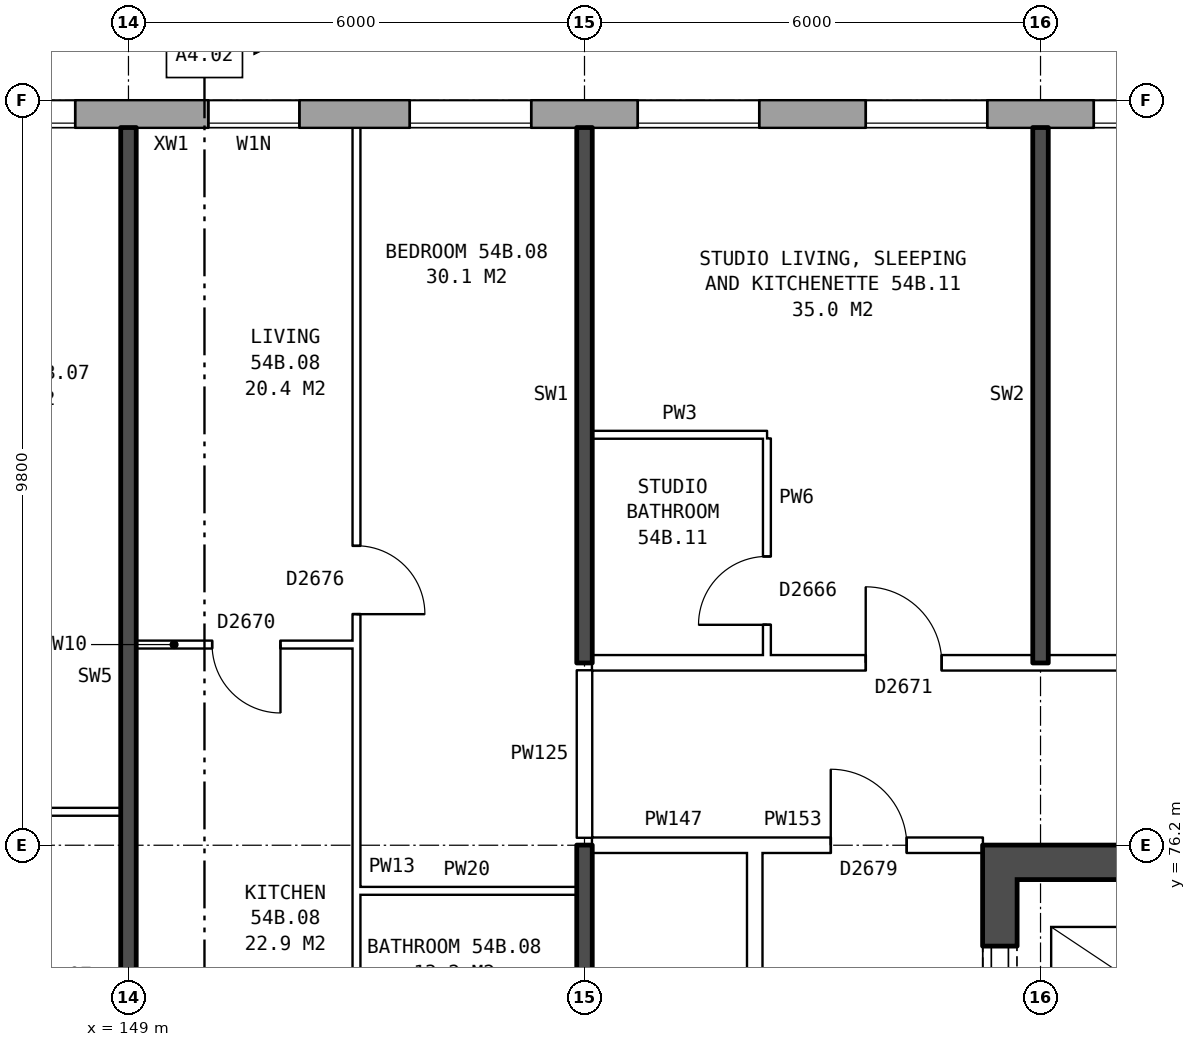
"""IFC4 building model, lengths in metres.
Left out: names, types, materials, properties, quantities, classifications, styles, units other than length and angle.
Written with IfcOpenShell. Run it as: python <this file> out.ifc"""

import sys

from ifc_helpers import new_model, si_unit, direction, frame, frame_2d, origin, place, context, subcontext, project, spatial, rectangle, extrude, element, fill, save


model = new_model("IFC4")
c1 = context("Model", 3, precision=1e-05, world=origin(), true_north=direction((0.0, 1.0)))
c2 = subcontext(c1, "Body", "Model", "MODEL_VIEW")
j1 = project(units=[si_unit("LENGTHUNIT", "METRE"), si_unit("PLANEANGLEUNIT", "RADIAN")], contexts=[c1])
p1 = place(None, origin())
s1 = spatial("IfcSite", under=j1, at=p1, CompositionType="ELEMENT")
p2 = place(p1, origin())
s2 = spatial("IfcBuilding", under=s1, at=p2, CompositionType="ELEMENT")
p3 = place(p2, frame((0.0, 0.0, 191.3)))
s3 = spatial("IfcBuildingStorey", under=s2, at=p3, CompositionType="ELEMENT", Elevation=191.3)
p4 = place(p3, frame((167.175, 85.82, 0.0), z_axis=(0.0, 0.0, 1.0), x_axis=(-1.0, 0.0, 0.0)))
e1 = element("IfcWall", 1, at=p4, inside=s3, PredefinedType="STANDARD", context=c2, shape_type="SweptSolid", body=[
    extrude(rectangle(XDim=33.101, YDim=0.36, at=frame_2d((16.55, 0.0))), origin(), (0.0, 0.0, 1.0), 2.85),
])
p5 = place(p4, frame((0.875, 0.0, 0.8)))
e2 = element("IfcOpeningElement", 2, at=p5, cuts=e1, PredefinedType="OPENING", context=c2, shape_type="SweptSolid", body=[
    extrude(rectangle(XDim=1.6, YDim=1.8, at=frame_2d((0.8, 0.9))), frame((0.0, 0.19, 0.0), z_axis=(0.0, -1.0, 0.0), x_axis=(1.0, 0.0, 0.0)), (0.0, 0.0, 1.0), 0.38),
])
p6 = place(p4, frame((3.875, 0.0, 0.8)))
e3 = element("IfcOpeningElement", 3, at=p6, cuts=e1, PredefinedType="OPENING", context=c2, shape_type="SweptSolid", body=[
    extrude(rectangle(XDim=1.6, YDim=1.8, at=frame_2d((0.8, 0.9))), frame((0.0, 0.19, 0.0), z_axis=(0.0, -1.0, 0.0), x_axis=(1.0, 0.0, 0.0)), (0.0, 0.0, 1.0), 0.38),
])
p7 = place(p4, frame((6.875, 0.0, 0.8)))
e4 = element("IfcOpeningElement", 4, at=p7, cuts=e1, PredefinedType="OPENING", context=c2, shape_type="SweptSolid", body=[
    extrude(rectangle(XDim=1.6, YDim=1.8, at=frame_2d((0.8, 0.9))), frame((0.0, 0.19, 0.0), z_axis=(0.0, -1.0, 0.0), x_axis=(1.0, 0.0, 0.0)), (0.0, 0.0, 1.0), 0.38),
])
p8 = place(p4, frame((9.875, 0.0, 0.8)))
e5 = element("IfcOpeningElement", 5, at=p8, cuts=e1, PredefinedType="OPENING", context=c2, shape_type="SweptSolid", body=[
    extrude(rectangle(XDim=1.6, YDim=1.8, at=frame_2d((0.8, 0.9))), frame((0.0, 0.19, 0.0), z_axis=(0.0, -1.0, 0.0), x_axis=(1.0, 0.0, 0.0)), (0.0, 0.0, 1.0), 0.38),
])
p9 = place(p4, frame((12.875, 0.0, 0.8)))
e6 = element("IfcOpeningElement", 6, at=p9, cuts=e1, PredefinedType="OPENING", context=c2, shape_type="SweptSolid", body=[
    extrude(rectangle(XDim=1.6, YDim=1.8, at=frame_2d((0.8, 0.9))), frame((0.0, 0.19, 0.0), z_axis=(0.0, -1.0, 0.0), x_axis=(1.0, 0.0, 0.0)), (0.0, 0.0, 1.0), 0.38),
])
p10 = place(p4, frame((15.925, 0.0, 0.15)))
e7 = element("IfcOpeningElement", 7, at=p10, cuts=e1, PredefinedType="OPENING", context=c2, shape_type="SweptSolid", body=[
    extrude(rectangle(XDim=1.2, YDim=1.2, at=frame_2d((0.6, 0.6))), frame((0.0, 0.19, 0.0), z_axis=(0.0, -1.0, 0.0), x_axis=(1.0, 0.0, 0.0)), (0.0, 0.0, 1.0), 0.38),
])
p11 = place(p4, frame((18.875, 0.0, 0.8)))
e8 = element("IfcOpeningElement", 8, at=p11, cuts=e1, PredefinedType="OPENING", context=c2, shape_type="SweptSolid", body=[
    extrude(rectangle(XDim=1.6, YDim=1.8, at=frame_2d((0.8, 0.9))), frame((0.0, 0.19, 0.0), z_axis=(0.0, -1.0, 0.0), x_axis=(1.0, 0.0, 0.0)), (0.0, 0.0, 1.0), 0.38),
])
p12 = place(p4, frame((21.875, 0.0, 0.8)))
e9 = element("IfcOpeningElement", 9, at=p12, cuts=e1, PredefinedType="OPENING", context=c2, shape_type="SweptSolid", body=[
    extrude(rectangle(XDim=1.6, YDim=1.8, at=frame_2d((0.8, 0.9))), frame((0.0, 0.19, 0.0), z_axis=(0.0, -1.0, 0.0), x_axis=(1.0, 0.0, 0.0)), (0.0, 0.0, 1.0), 0.38),
])
p13 = place(p4, frame((24.875, 0.0, 0.8)))
e10 = element("IfcOpeningElement", 10, at=p13, cuts=e1, PredefinedType="OPENING", context=c2, shape_type="SweptSolid", body=[
    extrude(rectangle(XDim=1.6, YDim=1.8, at=frame_2d((0.8, 0.9))), frame((0.0, 0.19, 0.0), z_axis=(0.0, -1.0, 0.0), x_axis=(1.0, 0.0, 0.0)), (0.0, 0.0, 1.0), 0.38),
])
p14 = place(p4, frame((27.875, 0.0, 0.8)))
e11 = element("IfcOpeningElement", 11, at=p14, cuts=e1, PredefinedType="OPENING", context=c2, shape_type="SweptSolid", body=[
    extrude(rectangle(XDim=1.6, YDim=1.8, at=frame_2d((0.8, 0.9))), frame((0.0, 0.19, 0.0), z_axis=(0.0, -1.0, 0.0), x_axis=(1.0, 0.0, 0.0)), (0.0, 0.0, 1.0), 0.38),
])
p15 = place(p4, frame((30.875, 0.0, 0.8)))
e12 = element("IfcOpeningElement", 12, at=p15, cuts=e1, PredefinedType="OPENING", context=c2, shape_type="SweptSolid", body=[
    extrude(rectangle(XDim=1.6, YDim=1.8, at=frame_2d((0.8, 0.9))), frame((0.0, 0.19, 0.0), z_axis=(0.0, -1.0, 0.0), x_axis=(1.0, 0.0, 0.0)), (0.0, 0.0, 1.0), 0.38),
])
p16 = place(p3, frame((160.465, 76.2, 0.0), z_axis=(0.0, 0.0, 1.0), x_axis=(0.0, -1.0, 0.0)))
e13 = element("IfcWall", 13, at=p16, inside=s3, PredefinedType="SHEAR", context=c2, shape_type="SweptSolid", body=[
    extrude(rectangle(XDim=12.4, YDim=0.45, at=frame_2d((6.2, 0.0))), origin(), (0.0, 0.0, 1.0), 2.85),
])
p17 = place(p16, frame((1.325, 0.0, 0.0)))
e14 = element("IfcOpeningElement", 14, at=p17, cuts=e13, PredefinedType="OPENING", context=c2, shape_type="SweptSolid", body=[
    extrude(rectangle(XDim=1.1, YDim=2.1, at=frame_2d((0.55, 1.05))), frame((0.0, 0.235, 0.0), z_axis=(0.0, -1.0, 0.0), x_axis=(1.0, 0.0, 0.0)), (0.0, 0.0, 1.0), 0.47),
])
p18 = place(p16, frame((3.825, 0.0, 0.0)))
e15 = element("IfcOpeningElement", 15, at=p18, cuts=e13, PredefinedType="OPENING", context=c2, shape_type="SweptSolid", body=[
    extrude(rectangle(XDim=0.85, YDim=2.1, at=frame_2d((0.425, 1.05))), frame((0.0, 0.235, 0.0), z_axis=(0.0, -1.0, 0.0), x_axis=(1.0, 0.0, 0.0)), (0.0, 0.0, 1.0), 0.47),
])
p19 = place(p16, frame((5.975, 0.0, 0.0)))
e16 = element("IfcOpeningElement", 16, at=p19, cuts=e13, PredefinedType="OPENING", context=c2, shape_type="SweptSolid", body=[
    extrude(rectangle(XDim=0.85, YDim=2.1, at=frame_2d((0.425, 1.05))), frame((0.0, 0.235, 0.0), z_axis=(0.0, -1.0, 0.0), x_axis=(1.0, 0.0, 0.0)), (0.0, 0.0, 1.0), 0.47),
])
p20 = place(p16, frame((9.9, 0.0, 0.0)))
e17 = element("IfcOpeningElement", 17, at=p20, cuts=e13, PredefinedType="OPENING", context=c2, shape_type="SweptSolid", body=[
    extrude(rectangle(XDim=1.1, YDim=2.1, at=frame_2d((0.55, 1.05))), frame((0.0, 0.235, 0.0), z_axis=(0.0, -1.0, 0.0), x_axis=(1.0, 0.0, 0.0)), (0.0, 0.0, 1.0), 0.47),
])
p21 = place(p16, frame((8.125, 0.0, 0.0)))
e18 = element("IfcOpeningElement", 18, at=p21, cuts=e13, PredefinedType="OPENING", context=c2, shape_type="SweptSolid", body=[
    extrude(rectangle(XDim=0.85, YDim=2.1, at=frame_2d((0.425, 1.05))), frame((0.0, 0.235, 0.0), z_axis=(0.0, -1.0, 0.0), x_axis=(1.0, 0.0, 0.0)), (0.0, 0.0, 1.0), 0.47),
])
p22 = place(p3, frame((160.69, 75.975, 0.0), z_axis=(0.0, 0.0, 1.0), x_axis=(1.0, 0.0, 0.0)))
e19 = element("IfcWall", 19, at=p22, inside=s3, PredefinedType="SHEAR", context=c2, shape_type="SweptSolid", body=[
    extrude(rectangle(XDim=7.5, YDim=0.45, at=frame_2d((3.75, 0.0))), origin(), (0.0, 0.0, 1.0), 2.85),
])
p23 = place(p3, frame((157.24, 63.9, 0.0), z_axis=(0.0, 0.0, 1.0), x_axis=(0.0, 1.0, 0.0)))
e20 = element("IfcWall", 20, at=p23, inside=s3, PredefinedType="PARTITIONING", context=c2, shape_type="SweptSolid", body=[
    extrude(rectangle(XDim=12.2, YDim=0.2, at=frame_2d((6.1, 0.0))), origin(), (0.0, 0.0, 1.0), 2.85),
])
p24 = place(p23, frame((5.1, 0.0, 0.0)))
e21 = element("IfcOpeningElement", 21, at=p24, cuts=e20, PredefinedType="OPENING", context=c2, shape_type="SweptSolid", body=[
    extrude(rectangle(XDim=2.0, YDim=2.1, at=frame_2d((1.0, 1.05))), frame((0.0, 0.11, 0.0), z_axis=(0.0, -1.0, 0.0), x_axis=(1.0, 0.0, 0.0)), (0.0, 0.0, 1.0), 0.22),
])
p25 = place(p3, frame((152.0, 75.6, 0.0), z_axis=(0.0, 0.0, 1.0), x_axis=(1.0, 0.0, 0.0)))
e22 = element("IfcWall", 22, at=p25, inside=s3, PredefinedType="PARTITIONING", context=c2, shape_type="SweptSolid", body=[
    extrude(rectangle(XDim=2.9, YDim=0.1, at=frame_2d((1.45, 0.0))), origin(), (0.0, 0.0, 1.0), 2.85),
])
p26 = place(p3, frame((155.1, 76.2, 0.0), z_axis=(0.0, 0.0, 1.0), x_axis=(1.0, 0.0, 0.0)))
e23 = element("IfcWall", 23, at=p26, inside=s3, PredefinedType="PARTITIONING", context=c2, shape_type="SweptSolid", body=[
    extrude(rectangle(XDim=2.14, YDim=0.2, at=frame_2d((1.07, 0.0))), origin(), (0.0, 0.0, 1.0), 2.85),
])
p27 = place(p3, frame((157.24, 76.2, 0.0), z_axis=(0.0, 0.0, 1.0), x_axis=(1.0, 0.0, 0.0)))
e24 = element("IfcWall", 24, at=p27, inside=s3, PredefinedType="PARTITIONING", context=c2, shape_type="SweptSolid", body=[
    extrude(rectangle(XDim=3.0, YDim=0.2, at=frame_2d((1.5, 0.0))), origin(), (0.0, 0.0, 1.0), 2.85),
])
p28 = place(p27, frame((1.0, 0.0, 0.0)))
e25 = element("IfcOpeningElement", 25, at=p28, cuts=e24, PredefinedType="OPENING", context=c2, shape_type="SweptSolid", body=[
    extrude(rectangle(XDim=1.0, YDim=2.1, at=frame_2d((0.5, 1.05))), frame((0.0, 0.11, 0.0), z_axis=(0.0, -1.0, 0.0), x_axis=(1.0, 0.0, 0.0)), (0.0, 0.0, 1.0), 0.22),
])
p29 = place(p3, frame((146.0, 76.64, 0.0), z_axis=(0.0, 0.0, 1.0), x_axis=(1.0, 0.0, 0.0)))
e26 = element("IfcWall", 26, at=p29, inside=s3, PredefinedType="PARTITIONING", context=c2, shape_type="SweptSolid", body=[
    extrude(rectangle(XDim=2.9, YDim=0.1, at=frame_2d((1.45, 0.0))), origin(), (0.0, 0.0, 1.0), 2.85),
])
p30 = place(p29, frame((1.0, 0.0, 0.0)))
e27 = element("IfcOpeningElement", 27, at=p30, cuts=e26, PredefinedType="OPENING", context=c2, shape_type="SweptSolid", body=[
    extrude(rectangle(XDim=0.9, YDim=2.1, at=frame_2d((0.45, 1.05))), frame((0.0, 0.06, 0.0), z_axis=(0.0, -1.0, 0.0), x_axis=(1.0, 0.0, 0.0)), (0.0, 0.0, 1.0), 0.12),
])
p31 = place(p3, frame((155.1, 78.6, 0.0), z_axis=(0.0, 0.0, 1.0), x_axis=(1.0, 0.0, 0.0)))
e28 = element("IfcWall", 28, at=p31, inside=s3, PredefinedType="PARTITIONING", context=c2, shape_type="SweptSolid", body=[
    extrude(rectangle(XDim=14.79, YDim=0.2, at=frame_2d((7.395, 0.0))), origin(), (0.0, 0.0, 1.0), 2.85),
])
p32 = place(p31, frame((3.6, 0.0, 0.0)))
e29 = element("IfcOpeningElement", 29, at=p32, cuts=e28, PredefinedType="OPENING", context=c2, shape_type="SweptSolid", body=[
    extrude(rectangle(XDim=1.0, YDim=2.1, at=frame_2d((0.5, 1.05))), frame((0.0, 0.11, 0.0), z_axis=(0.0, -1.0, 0.0), x_axis=(1.0, 0.0, 0.0)), (0.0, 0.0, 1.0), 0.22),
])
p33 = place(p31, frame((7.2, 0.0, 0.0)))
e30 = element("IfcOpeningElement", 30, at=p33, cuts=e28, PredefinedType="OPENING", context=c2, shape_type="SweptSolid", body=[
    extrude(rectangle(XDim=1.0, YDim=2.1, at=frame_2d((0.5, 1.05))), frame((0.0, 0.11, 0.0), z_axis=(0.0, -1.0, 0.0), x_axis=(1.0, 0.0, 0.0)), (0.0, 0.0, 1.0), 0.22),
])
p34 = place(p3, frame((149.1, 78.84, 0.0), z_axis=(0.0, 0.0, 1.0), x_axis=(1.0, 0.0, 0.0)))
e31 = element("IfcWall", 31, at=p34, inside=s3, PredefinedType="PARTITIONING", context=c2, shape_type="SweptSolid", body=[
    extrude(rectangle(XDim=2.9, YDim=0.1, at=frame_2d((1.45, 0.0))), origin(), (0.0, 0.0, 1.0), 2.85),
])
p35 = place(p34, frame((1.0, 0.0, 0.0)))
e32 = element("IfcOpeningElement", 32, at=p35, cuts=e31, PredefinedType="OPENING", context=c2, shape_type="SweptSolid", body=[
    extrude(rectangle(XDim=0.9, YDim=2.1, at=frame_2d((0.45, 1.05))), frame((0.0, 0.06, 0.0), z_axis=(0.0, -1.0, 0.0), x_axis=(1.0, 0.0, 0.0)), (0.0, 0.0, 1.0), 0.12),
])
p36 = place(p3, frame((155.1, 81.6, 0.0), z_axis=(0.0, 0.0, 1.0), x_axis=(1.0, 0.0, 0.0)))
e33 = element("IfcWall", 33, at=p36, inside=s3, PredefinedType="PARTITIONING", context=c2, shape_type="SweptSolid", body=[
    extrude(rectangle(XDim=2.3, YDim=0.1, at=frame_2d((1.15, 0.0))), origin(), (0.0, 0.0, 1.0), 2.85),
])
p37 = place(p3, frame((149.0, 71.2, 0.0), z_axis=(0.0, 0.0, 1.0), x_axis=(0.0, 1.0, 0.0)))
e34 = element("IfcWall", 34, at=p37, inside=s3, PredefinedType="SOLIDWALL", context=c2, shape_type="SweptSolid", body=[
    extrude(rectangle(XDim=14.44, YDim=0.2, at=frame_2d((7.22, 0.0))), origin(), (0.0, 0.0, 1.0), 2.85),
])
p38 = place(p3, frame((152.0, 71.3, 0.0), z_axis=(0.0, 0.0, 1.0), x_axis=(0.0, 1.0, 0.0)))
e35 = element("IfcWall", 35, at=p38, inside=s3, PredefinedType="PARTITIONING", context=c2, shape_type="SweptSolid", body=[
    extrude(rectangle(XDim=14.34, YDim=0.1, at=frame_2d((7.17, 0.0))), origin(), (0.0, 0.0, 1.0), 2.85),
])
p39 = place(p38, frame((7.94, 0.0, 0.0)))
e36 = element("IfcOpeningElement", 36, at=p39, cuts=e35, PredefinedType="OPENING", context=c2, shape_type="SweptSolid", body=[
    extrude(rectangle(XDim=0.9, YDim=2.1, at=frame_2d((0.45, 1.05))), frame((0.0, 0.06, 0.0), z_axis=(0.0, -1.0, 0.0), x_axis=(1.0, 0.0, 0.0)), (0.0, 0.0, 1.0), 0.12),
])
p40 = place(p38, frame((0.4, 0.0, 0.0)))
e37 = element("IfcOpeningElement", 37, at=p40, cuts=e35, PredefinedType="OPENING", context=c2, shape_type="SweptSolid", body=[
    extrude(rectangle(XDim=0.9, YDim=2.1, at=frame_2d((0.45, 1.05))), frame((0.0, 0.06, 0.0), z_axis=(0.0, -1.0, 0.0), x_axis=(1.0, 0.0, 0.0)), (0.0, 0.0, 1.0), 0.12),
])
p41 = place(p3, frame((155.0, 71.2, 0.0), z_axis=(0.0, 0.0, 1.0), x_axis=(0.0, 1.0, 0.0)))
e38 = element("IfcWall", 38, at=p41, inside=s3, PredefinedType="SOLIDWALL", context=c2, shape_type="SweptSolid", body=[
    extrude(rectangle(XDim=5.0, YDim=0.2, at=frame_2d((2.5, 0.0))), origin(), (0.0, 0.0, 1.0), 2.85),
])
p42 = place(p3, frame((155.0, 76.3, 0.0), z_axis=(0.0, 0.0, 1.0), x_axis=(0.0, 1.0, 0.0)))
e39 = element("IfcWall", 39, at=p42, inside=s3, PredefinedType="PARTITIONING", context=c2, shape_type="SweptSolid", body=[
    extrude(rectangle(XDim=2.2, YDim=0.2, at=frame_2d((1.1, 0.0))), origin(), (0.0, 0.0, 1.0), 2.85),
])
p43 = place(p3, frame((155.0, 78.6, 0.0), z_axis=(0.0, 0.0, 1.0), x_axis=(0.0, 1.0, 0.0)))
e40 = element("IfcWall", 40, at=p43, inside=s3, PredefinedType="SOLIDWALL", context=c2, shape_type="SweptSolid", body=[
    extrude(rectangle(XDim=7.04, YDim=0.2, at=frame_2d((3.52, 0.0))), origin(), (0.0, 0.0, 1.0), 2.85),
])
p44 = place(p3, frame((157.4, 78.7, 0.0), z_axis=(0.0, 0.0, 1.0), x_axis=(0.0, 1.0, 0.0)))
e41 = element("IfcWall", 41, at=p44, inside=s3, PredefinedType="PARTITIONING", context=c2, shape_type="SweptSolid", body=[
    extrude(rectangle(XDim=2.85, YDim=0.1, at=frame_2d((1.425, 0.0))), origin(), (0.0, 0.0, 1.0), 2.85),
])
p45 = place(p44, frame((0.4, 0.0, 0.0)))
e42 = element("IfcOpeningElement", 42, at=p45, cuts=e41, PredefinedType="OPENING", context=c2, shape_type="SweptSolid", body=[
    extrude(rectangle(XDim=0.9, YDim=2.1, at=frame_2d((0.45, 1.05))), frame((0.0, 0.06, 0.0), z_axis=(0.0, -1.0, 0.0), x_axis=(1.0, 0.0, 0.0)), (0.0, 0.0, 1.0), 0.12),
])
p46 = place(p3, frame((161.0, 78.6, 0.0), z_axis=(0.0, 0.0, 1.0), x_axis=(0.0, 1.0, 0.0)))
e43 = element("IfcWall", 43, at=p46, inside=s3, PredefinedType="SOLIDWALL", context=c2, shape_type="SweptSolid", body=[
    extrude(rectangle(XDim=7.04, YDim=0.2, at=frame_2d((3.52, 0.0))), origin(), (0.0, 0.0, 1.0), 2.85),
])
p47 = place(p6, origin())
e44 = element("IfcWindow", 44, at=p47, inside=s3, PartitioningType="SINGLE_PANEL", PredefinedType="WINDOW", context=c2, shape_type="SweptSolid", body=[
    extrude(rectangle(XDim=1.6, YDim=1.8, at=frame_2d((0.8, 0.9))), frame((0.0, 0.15, 0.0), z_axis=(0.0, -1.0, 0.0), x_axis=(1.0, 0.0, 0.0)), (0.0, 0.0, 1.0), 0.06),
])
fill(e3, e44)
p48 = place(p7, origin())
e45 = element("IfcWindow", 45, at=p48, inside=s3, PartitioningType="SINGLE_PANEL", PredefinedType="WINDOW", context=c2, shape_type="SweptSolid", body=[
    extrude(rectangle(XDim=1.6, YDim=1.8, at=frame_2d((0.8, 0.9))), frame((0.0, 0.15, 0.0), z_axis=(0.0, -1.0, 0.0), x_axis=(1.0, 0.0, 0.0)), (0.0, 0.0, 1.0), 0.06),
])
fill(e4, e45)
p49 = place(p8, origin())
e46 = element("IfcWindow", 46, at=p49, inside=s3, PartitioningType="SINGLE_PANEL", PredefinedType="WINDOW", context=c2, shape_type="SweptSolid", body=[
    extrude(rectangle(XDim=1.6, YDim=1.8, at=frame_2d((0.8, 0.9))), frame((0.0, 0.15, 0.0), z_axis=(0.0, -1.0, 0.0), x_axis=(1.0, 0.0, 0.0)), (0.0, 0.0, 1.0), 0.06),
])
fill(e5, e46)
p50 = place(p9, origin())
e47 = element("IfcWindow", 47, at=p50, inside=s3, PartitioningType="SINGLE_PANEL", PredefinedType="WINDOW", context=c2, shape_type="SweptSolid", body=[
    extrude(rectangle(XDim=1.6, YDim=1.8, at=frame_2d((0.8, 0.9))), frame((0.0, 0.15, 0.0), z_axis=(0.0, -1.0, 0.0), x_axis=(1.0, 0.0, 0.0)), (0.0, 0.0, 1.0), 0.06),
])
fill(e6, e47)
p51 = place(p10, origin())
e48 = element("IfcWindow", 48, at=p51, inside=s3, PartitioningType="SINGLE_PANEL", PredefinedType="WINDOW", context=c2, shape_type="SweptSolid", body=[
    extrude(rectangle(XDim=1.2, YDim=1.2, at=frame_2d((0.6, 0.6))), frame((0.0, 0.15, 0.0), z_axis=(0.0, -1.0, 0.0), x_axis=(1.0, 0.0, 0.0)), (0.0, 0.0, 1.0), 0.06),
])
fill(e7, e48)
p52 = place(p11, origin())
e49 = element("IfcWindow", 49, at=p52, inside=s3, PartitioningType="SINGLE_PANEL", PredefinedType="WINDOW", context=c2, shape_type="SweptSolid", body=[
    extrude(rectangle(XDim=1.6, YDim=1.8, at=frame_2d((0.8, 0.9))), frame((0.0, 0.15, 0.0), z_axis=(0.0, -1.0, 0.0), x_axis=(1.0, 0.0, 0.0)), (0.0, 0.0, 1.0), 0.06),
])
fill(e8, e49)
p53 = place(p17, origin())
e50 = element("IfcDoor", 50, at=p53, inside=s3, OperationType="DOUBLE_DOOR_SLIDING", PredefinedType="DOOR", context=c2, shape_type="SweptSolid", body=[
    extrude(rectangle(XDim=1.1, YDim=2.1, at=frame_2d((0.55, 1.05))), frame((0.0, 0.21, 0.0), z_axis=(0.0, -1.0, 0.0), x_axis=(1.0, 0.0, 0.0)), (0.0, 0.0, 1.0), 0.05),
])
fill(e14, e50)
p54 = place(p28, origin())
e51 = element("IfcDoor", 51, at=p54, inside=s3, OperationType="SINGLE_SWING_LEFT", PredefinedType="DOOR", context=c2, shape_type="SweptSolid", body=[
    extrude(rectangle(XDim=1.0, YDim=2.1, at=frame_2d((0.5, 1.05))), frame((0.0, 0.025, 0.0), z_axis=(0.0, -1.0, 0.0), x_axis=(1.0, 0.0, 0.0)), (0.0, 0.0, 1.0), 0.05),
])
fill(e25, e51)
p55 = place(p39, frame((0.9, 0.0, 0.0), z_axis=(0.0, 0.0, 1.0), x_axis=(-1.0, 0.0, 0.0)))
e52 = element("IfcDoor", 52, at=p55, inside=s3, OperationType="SINGLE_SWING_RIGHT", PredefinedType="DOOR", context=c2, shape_type="SweptSolid", body=[
    extrude(rectangle(XDim=0.9, YDim=2.1, at=frame_2d((0.45, 1.05))), frame((0.0, 0.025, 0.0), z_axis=(0.0, -1.0, 0.0), x_axis=(1.0, 0.0, 0.0)), (0.0, 0.0, 1.0), 0.05),
])
fill(e36, e52)
p56 = place(p35, frame((0.9, 0.0, 0.0), z_axis=(0.0, 0.0, 1.0), x_axis=(-1.0, 0.0, 0.0)))
e53 = element("IfcDoor", 53, at=p56, inside=s3, OperationType="SINGLE_SWING_LEFT", PredefinedType="DOOR", context=c2, shape_type="SweptSolid", body=[
    extrude(rectangle(XDim=0.9, YDim=2.1, at=frame_2d((0.45, 1.05))), frame((0.0, 0.025, 0.0), z_axis=(0.0, -1.0, 0.0), x_axis=(1.0, 0.0, 0.0)), (0.0, 0.0, 1.0), 0.05),
])
fill(e32, e53)
p57 = place(p32, origin())
e54 = element("IfcDoor", 54, at=p57, inside=s3, OperationType="SINGLE_SWING_LEFT", PredefinedType="DOOR", context=c2, shape_type="SweptSolid", body=[
    extrude(rectangle(XDim=1.0, YDim=2.1, at=frame_2d((0.5, 1.05))), frame((0.0, 0.025, 0.0), z_axis=(0.0, -1.0, 0.0), x_axis=(1.0, 0.0, 0.0)), (0.0, 0.0, 1.0), 0.05),
])
fill(e29, e54)
p58 = place(p45, origin())
e55 = element("IfcDoor", 55, at=p58, inside=s3, OperationType="SINGLE_SWING_LEFT", PredefinedType="DOOR", context=c2, shape_type="SweptSolid", body=[
    extrude(rectangle(XDim=0.9, YDim=2.1, at=frame_2d((0.45, 1.05))), frame((0.0, 0.025, 0.0), z_axis=(0.0, -1.0, 0.0), x_axis=(1.0, 0.0, 0.0)), (0.0, 0.0, 1.0), 0.05),
])
fill(e42, e55)
save(model, sys.argv[1])
